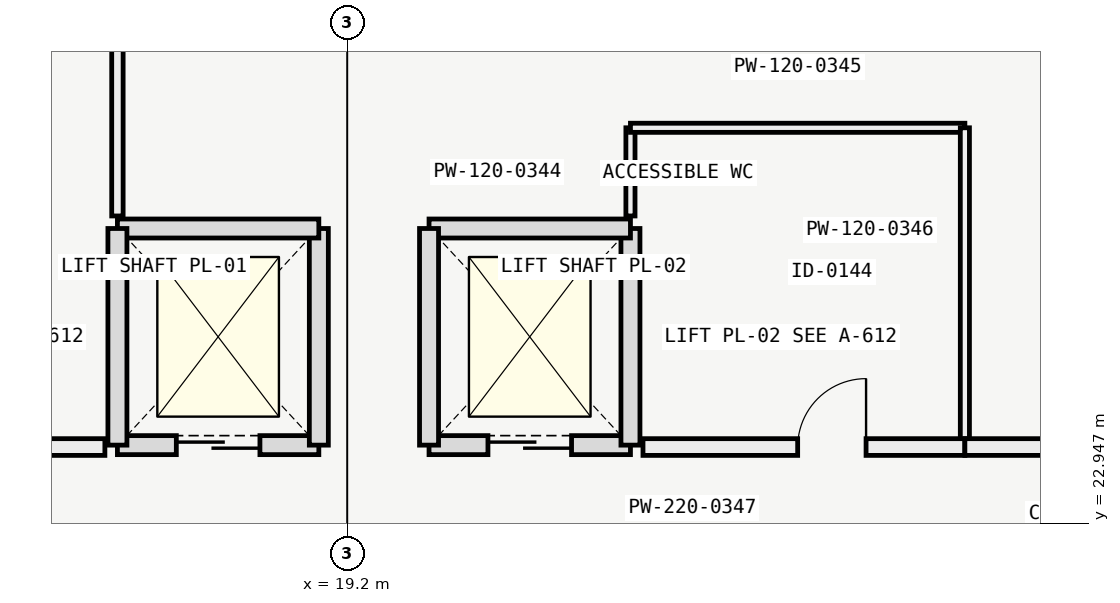
"""IFC4 building model, lengths in metres.
Left out: names, types, materials, properties, quantities, classifications, styles, units other than length and angle.
Written with IfcOpenShell. Run it as: python <this file> out.ifc"""

import sys

from ifc_helpers import new_model, si_unit, direction, frame, frame_2d, origin, place, context, subcontext, project, spatial, rectangle, extrude, element, fill, save


model = new_model("IFC4")
c1 = context("Model", 3, precision=1e-05, world=origin(), true_north=direction((0.0, 1.0)))
c2 = subcontext(c1, "Body", "Model", "MODEL_VIEW")
j1 = project(units=[si_unit("LENGTHUNIT", "METRE"), si_unit("PLANEANGLEUNIT", "RADIAN")], contexts=[c1])
p1 = place(None, origin())
s1 = spatial("IfcSite", under=j1, at=p1, CompositionType="ELEMENT")
p2 = place(p1, origin())
s2 = spatial("IfcBuilding", under=s1, at=p2, CompositionType="ELEMENT")
p3 = place(p2, origin())
s3 = spatial("IfcBuildingStorey", under=s2, at=p3, CompositionType="ELEMENT", Elevation=0.0)
p4 = place(p3, frame((16.175, 23.975, 0.0), z_axis=(0.0, 0.0, 1.0), x_axis=(1.0, 0.0, 0.0)))
e1 = element("IfcWall", 1, at=p4, inside=s3, PredefinedType="SOLIDWALL", context=c2, shape_type="SweptSolid", body=[
    extrude(rectangle(XDim=2.65, YDim=0.25, at=frame_2d((1.325, 0.0))), origin(), (0.0, 0.0, 1.0), 5.12),
])
p5 = place(p4, frame((0.775, 0.0, 0.0)))
e2 = element("IfcOpeningElement", 2, at=p5, cuts=e1, PredefinedType="OPENING", context=c2, shape_type="SweptSolid", body=[
    extrude(rectangle(XDim=1.1, YDim=2.1, at=frame_2d((0.55, 1.05))), frame((0.0, 0.135, 0.0), z_axis=(0.0, -1.0, 0.0), x_axis=(1.0, 0.0, 0.0)), (0.0, 0.0, 1.0), 0.27),
])
p6 = place(p3, frame((18.825, 23.975, 0.0), z_axis=(0.0, 0.0, 1.0), x_axis=(0.0, 1.0, 0.0)))
e3 = element("IfcWall", 3, at=p6, inside=s3, PredefinedType="SOLIDWALL", context=c2, shape_type="SweptSolid", body=[
    extrude(rectangle(XDim=2.85, YDim=0.25, at=frame_2d((1.425, 0.0))), origin(), (0.0, 0.0, 1.0), 5.12),
])
p7 = place(p3, frame((18.825, 26.825, 0.0), z_axis=(0.0, 0.0, 1.0), x_axis=(-1.0, 0.0, 0.0)))
e4 = element("IfcWall", 4, at=p7, inside=s3, PredefinedType="SOLIDWALL", context=c2, shape_type="SweptSolid", body=[
    extrude(rectangle(XDim=2.65, YDim=0.25, at=frame_2d((1.325, 0.0))), origin(), (0.0, 0.0, 1.0), 5.12),
])
p8 = place(p3, frame((16.175, 26.825, 0.0), z_axis=(0.0, 0.0, 1.0), x_axis=(0.0, -1.0, 0.0)))
e5 = element("IfcWall", 5, at=p8, inside=s3, PredefinedType="SOLIDWALL", context=c2, shape_type="SweptSolid", body=[
    extrude(rectangle(XDim=2.85, YDim=0.25, at=frame_2d((1.425, 0.0))), origin(), (0.0, 0.0, 1.0), 5.12),
])
p9 = place(p3, frame((20.275, 23.975, 0.0), z_axis=(0.0, 0.0, 1.0), x_axis=(1.0, 0.0, 0.0)))
e6 = element("IfcWall", 6, at=p9, inside=s3, PredefinedType="SOLIDWALL", context=c2, shape_type="SweptSolid", body=[
    extrude(rectangle(XDim=2.65, YDim=0.25, at=frame_2d((1.325, 0.0))), origin(), (0.0, 0.0, 1.0), 5.12),
])
p10 = place(p9, frame((0.775, 0.0, 0.0)))
e7 = element("IfcOpeningElement", 7, at=p10, cuts=e6, PredefinedType="OPENING", context=c2, shape_type="SweptSolid", body=[
    extrude(rectangle(XDim=1.1, YDim=2.1, at=frame_2d((0.55, 1.05))), frame((0.0, 0.135, 0.0), z_axis=(0.0, -1.0, 0.0), x_axis=(1.0, 0.0, 0.0)), (0.0, 0.0, 1.0), 0.27),
])
p11 = place(p3, frame((22.925, 23.975, 0.0), z_axis=(0.0, 0.0, 1.0), x_axis=(0.0, 1.0, 0.0)))
e8 = element("IfcWall", 8, at=p11, inside=s3, PredefinedType="SOLIDWALL", context=c2, shape_type="SweptSolid", body=[
    extrude(rectangle(XDim=2.85, YDim=0.25, at=frame_2d((1.425, 0.0))), origin(), (0.0, 0.0, 1.0), 5.12),
])
p12 = place(p3, frame((22.925, 26.825, 0.0), z_axis=(0.0, 0.0, 1.0), x_axis=(-1.0, 0.0, 0.0)))
e9 = element("IfcWall", 9, at=p12, inside=s3, PredefinedType="SOLIDWALL", context=c2, shape_type="SweptSolid", body=[
    extrude(rectangle(XDim=2.65, YDim=0.25, at=frame_2d((1.325, 0.0))), origin(), (0.0, 0.0, 1.0), 5.12),
])
p13 = place(p3, frame((20.275, 26.825, 0.0), z_axis=(0.0, 0.0, 1.0), x_axis=(0.0, -1.0, 0.0)))
e10 = element("IfcWall", 10, at=p13, inside=s3, PredefinedType="SOLIDWALL", context=c2, shape_type="SweptSolid", body=[
    extrude(rectangle(XDim=2.85, YDim=0.25, at=frame_2d((1.425, 0.0))), origin(), (0.0, 0.0, 1.0), 5.12),
])
p14 = place(p3, frame((22.925, 26.99, 0.0), z_axis=(0.0, 0.0, 1.0), x_axis=(0.0, 1.0, 0.0)))
e11 = element("IfcWall", 11, at=p14, inside=s3, PredefinedType="PARTITIONING", context=c2, shape_type="SweptSolid", body=[
    extrude(rectangle(XDim=1.16, YDim=0.12, at=frame_2d((0.58, 0.0))), origin(), (0.0, 0.0, 1.0), 5.05),
])
p15 = place(p3, frame((22.925, 28.15, 0.0), z_axis=(0.0, 0.0, 1.0), x_axis=(1.0, 0.0, 0.0)))
e12 = element("IfcWall", 12, at=p15, inside=s3, PredefinedType="PARTITIONING", context=c2, shape_type="SweptSolid", body=[
    extrude(rectangle(XDim=4.4, YDim=0.12, at=frame_2d((2.2, 0.0))), origin(), (0.0, 0.0, 1.0), 5.05),
])
p16 = place(p3, frame((27.325, 23.95, 0.0), z_axis=(0.0, 0.0, 1.0), x_axis=(0.0, 1.0, 0.0)))
e13 = element("IfcWall", 13, at=p16, inside=s3, PredefinedType="PARTITIONING", context=c2, shape_type="SweptSolid", body=[
    extrude(rectangle(XDim=4.2, YDim=0.12, at=frame_2d((2.1, 0.0))), origin(), (0.0, 0.0, 1.0), 5.05),
])
p17 = place(p3, frame((23.09, 23.95, 0.0), z_axis=(0.0, 0.0, 1.0), x_axis=(1.0, 0.0, 0.0)))
e14 = element("IfcWall", 14, at=p17, inside=s3, PredefinedType="PARTITIONING", context=c2, shape_type="SweptSolid", body=[
    extrude(rectangle(XDim=4.235, YDim=0.22, at=frame_2d((2.117, 0.0))), origin(), (0.0, 0.0, 1.0), 5.05),
])
p18 = place(p17, frame((2.035, 0.0, 0.0)))
e15 = element("IfcOpeningElement", 15, at=p18, cuts=e14, PredefinedType="OPENING", context=c2, shape_type="SweptSolid", body=[
    extrude(rectangle(XDim=0.9, YDim=2.05, at=frame_2d((0.45, 1.025))), frame((0.0, 0.12, 0.0), z_axis=(0.0, -1.0, 0.0), x_axis=(1.0, 0.0, 0.0)), (0.0, 0.0, 1.0), 0.24),
])
p19 = place(p3, frame((16.175, 26.99, 0.0), z_axis=(0.0, 0.0, 1.0), x_axis=(0.0, 1.0, 0.0)))
e16 = element("IfcWall", 16, at=p19, inside=s3, PredefinedType="PARTITIONING", context=c2, shape_type="SweptSolid", body=[
    extrude(rectangle(XDim=13.66, YDim=0.15, at=frame_2d((6.83, 0.0))), origin(), (0.0, 0.0, 1.0), 4.4),
])
p20 = place(p3, frame((0.15, 23.95, 0.0), z_axis=(0.0, 0.0, 1.0), x_axis=(1.0, 0.0, 0.0)))
e17 = element("IfcWall", 17, at=p20, inside=s3, PredefinedType="PARTITIONING", context=c2, shape_type="SweptSolid", body=[
    extrude(rectangle(XDim=15.86, YDim=0.22, at=frame_2d((7.93, 0.0))), origin(), (0.0, 0.0, 1.0), 4.45),
])
p21 = place(p20, frame((6.05, 0.0, 0.0)))
e18 = element("IfcOpeningElement", 18, at=p21, cuts=e17, PredefinedType="OPENING", context=c2, shape_type="SweptSolid", body=[
    extrude(rectangle(XDim=1.5, YDim=2.2, at=frame_2d((0.75, 1.1))), frame((0.0, 0.12, 0.0), z_axis=(0.0, -1.0, 0.0), x_axis=(1.0, 0.0, 0.0)), (0.0, 0.0, 1.0), 0.24),
])
p22 = place(p20, frame((13.0, 0.0, 0.0)))
e19 = element("IfcOpeningElement", 19, at=p22, cuts=e17, PredefinedType="OPENING", context=c2, shape_type="SweptSolid", body=[
    extrude(rectangle(XDim=0.95, YDim=2.1, at=frame_2d((0.475, 1.05))), frame((0.0, 0.12, 0.0), z_axis=(0.0, -1.0, 0.0), x_axis=(1.0, 0.0, 0.0)), (0.0, 0.0, 1.0), 0.24),
])
p23 = place(p3, frame((27.325, 23.95, 0.0), z_axis=(0.0, 0.0, 1.0), x_axis=(1.0, 0.0, 0.0)))
e20 = element("IfcWall", 20, at=p23, inside=s3, PredefinedType="PARTITIONING", context=c2, shape_type="SweptSolid", body=[
    extrude(rectangle(XDim=6.985, YDim=0.22, at=frame_2d((3.493, 0.0))), origin(), (0.0, 0.0, 1.0), 4.45),
])
p24 = place(p23, frame((4.1, 0.0, 0.0)))
e21 = element("IfcOpeningElement", 21, at=p24, cuts=e20, PredefinedType="OPENING", context=c2, shape_type="SweptSolid", body=[
    extrude(rectangle(XDim=1.5, YDim=2.2, at=frame_2d((0.75, 1.1))), frame((0.0, 0.12, 0.0), z_axis=(0.0, -1.0, 0.0), x_axis=(1.0, 0.0, 0.0)), (0.0, 0.0, 1.0), 0.24),
])
p25 = place(p5, origin())
e22 = element("IfcDoor", 22, at=p25, inside=s3, OperationType="SLIDING_TO_LEFT", PredefinedType="DOOR", context=c2, shape_type="SweptSolid", body=[
    extrude(rectangle(XDim=1.1, YDim=2.1, at=frame_2d((0.55, 1.05))), frame((0.0, 0.025, 0.0), z_axis=(0.0, -1.0, 0.0), x_axis=(1.0, 0.0, 0.0)), (0.0, 0.0, 1.0), 0.05),
])
fill(e2, e22)
p26 = place(p10, origin())
e23 = element("IfcDoor", 23, at=p26, inside=s3, OperationType="SLIDING_TO_LEFT", PredefinedType="DOOR", context=c2, shape_type="SweptSolid", body=[
    extrude(rectangle(XDim=1.1, YDim=2.1, at=frame_2d((0.55, 1.05))), frame((0.0, 0.025, 0.0), z_axis=(0.0, -1.0, 0.0), x_axis=(1.0, 0.0, 0.0)), (0.0, 0.0, 1.0), 0.05),
])
fill(e7, e23)
p27 = place(p18, origin())
e24 = element("IfcDoor", 24, at=p27, inside=s3, OperationType="SINGLE_SWING_RIGHT", PredefinedType="DOOR", context=c2, shape_type="SweptSolid", body=[
    extrude(rectangle(XDim=0.9, YDim=2.05, at=frame_2d((0.45, 1.025))), frame((0.0, 0.025, 0.0), z_axis=(0.0, -1.0, 0.0), x_axis=(1.0, 0.0, 0.0)), (0.0, 0.0, 1.0), 0.05),
])
fill(e15, e24)
save(model, sys.argv[1])
